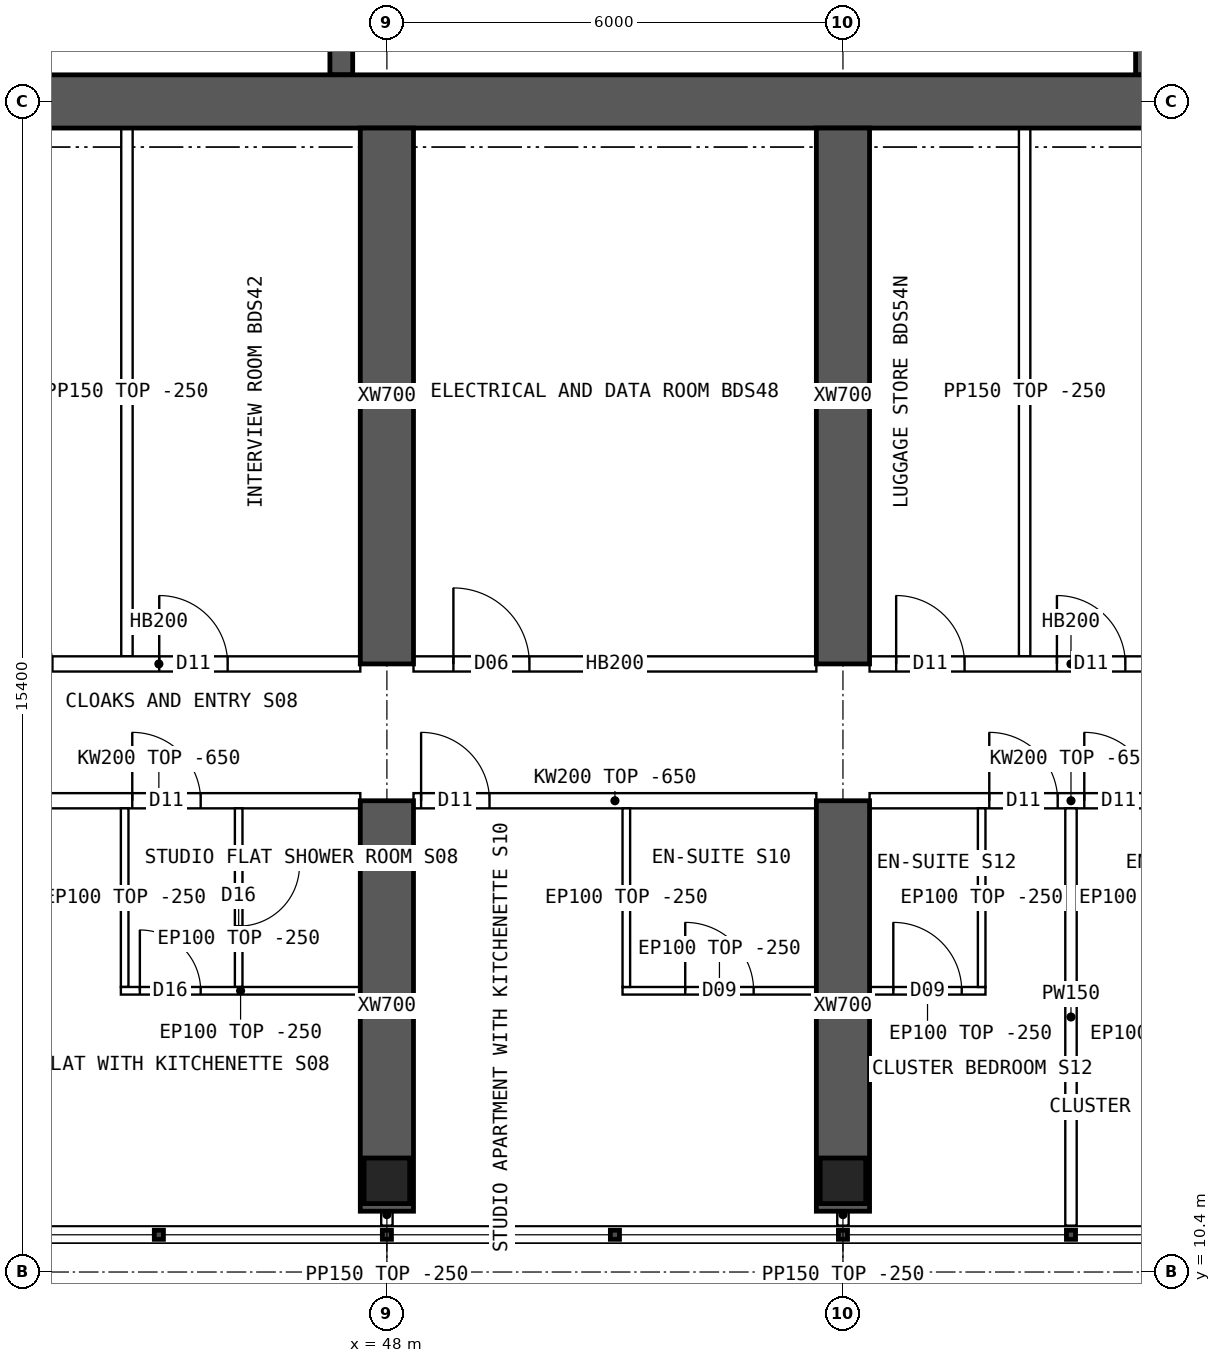
"""IFC4 building model, lengths in metres.
Left out: names, types, materials, properties, quantities, classifications, styles, units other than length and angle.
Written with IfcOpenShell. Run it as: python <this file> out.ifc"""

import sys

from ifc_helpers import new_model, si_unit, direction, frame, frame_2d, origin, origin_2d, place, context, subcontext, project, spatial, polyline, rectangle, hollow_rectangle, outline, extrude, element, fill, save


model = new_model("IFC4")
c1 = context("Model", 3, precision=1e-05, world=origin(), true_north=direction((0.0, 1.0)))
c2 = subcontext(c1, "Body", "Model", "MODEL_VIEW")
j1 = project(units=[si_unit("LENGTHUNIT", "METRE"), si_unit("PLANEANGLEUNIT", "RADIAN")], contexts=[c1])
p1 = place(None, origin())
s1 = spatial("IfcSite", under=j1, at=p1, CompositionType="ELEMENT")
p2 = place(p1, origin())
s2 = spatial("IfcBuilding", under=s1, at=p2, CompositionType="ELEMENT")
p3 = place(p2, frame((0.0, 0.0, 220.3)))
s3 = spatial("IfcBuildingStorey", under=s2, at=p3, CompositionType="ELEMENT", Elevation=220.3)
for number, where, z_axis, x_axis in (
    (1, (48.0, 11.6, 0.0), (0.0, 0.0, 1.0), (1.0, 0.0, 0.0)),
    (2, (54.0, 11.6, 0.0), (0.0, 0.0, 1.0), (1.0, 0.0, 0.0)),
):
    element("IfcColumn", number, at=place(p3, frame(where, z_axis=z_axis, x_axis=x_axis)), inside=s3, PredefinedType="COLUMN", context=c2, shape_type="SweptSolid", body=[
        extrude(hollow_rectangle(XDim=0.6, YDim=0.6, WallThickness=0.06, at=origin_2d()), origin(), (0.0, 0.0, 1.0), 3.75),
    ])
p4 = place(p3, frame((18.0, 25.8, 0.0), z_axis=(0.0, 0.0, 1.0), x_axis=(1.0, 0.0, 0.0)))
e3 = element("IfcWall", 3, at=p4, inside=s3, PredefinedType="SHEAR", context=c2, shape_type="SweptSolid", body=[
    extrude(rectangle(XDim=48.0, YDim=0.7, at=frame_2d((24.0, 0.0))), origin(), (0.0, 0.0, 1.0), 3.75),
])
for number, where, z_axis, x_axis in (
    (4, (58.0, 26.15, 0.0), (0.0, 0.0, 1.0), (0.0, 1.0, 0.0)),
    (5, (47.4, 26.15, 0.0), (0.0, 0.0, 1.0), (0.0, 1.0, 0.0)),
):
    element("IfcWall", number, at=place(p3, frame(where, z_axis=z_axis, x_axis=x_axis)), inside=s3, PredefinedType="SHEAR", context=c2, shape_type="SweptSolid", body=[
        extrude(rectangle(XDim=4.1, YDim=0.3, at=frame_2d((2.05, 0.0))), origin(), (0.0, 0.0, 1.0), 3.75),
    ])
p5 = place(p3, frame((48.0, 11.2, 0.0), z_axis=(0.0, 0.0, 1.0), x_axis=(0.0, 1.0, 0.0)))
e6 = element("IfcWall", 6, at=p5, inside=s3, PredefinedType="SHEAR", context=c2, shape_type="SweptSolid", body=[
    extrude(rectangle(XDim=5.4, YDim=0.7, at=frame_2d((2.7, 0.0))), origin(), (0.0, 0.0, 1.0), 3.75),
])
p6 = place(p3, frame((48.0, 18.4, 0.0), z_axis=(0.0, 0.0, 1.0), x_axis=(0.0, 1.0, 0.0)))
e7 = element("IfcWall", 7, at=p6, inside=s3, PredefinedType="SHEAR", context=c2, shape_type="SweptSolid", body=[
    extrude(rectangle(XDim=7.05, YDim=0.7, at=frame_2d((3.525, 0.0))), origin(), (0.0, 0.0, 1.0), 3.75),
])
p7 = place(p3, frame((54.0, 11.2, 0.0), z_axis=(0.0, 0.0, 1.0), x_axis=(0.0, 1.0, 0.0)))
e8 = element("IfcWall", 8, at=p7, inside=s3, PredefinedType="SHEAR", context=c2, shape_type="SweptSolid", body=[
    extrude(rectangle(XDim=5.4, YDim=0.7, at=frame_2d((2.7, 0.0))), origin(), (0.0, 0.0, 1.0), 3.75),
])
p8 = place(p3, frame((54.0, 18.4, 0.0), z_axis=(0.0, 0.0, 1.0), x_axis=(0.0, 1.0, 0.0)))
e9 = element("IfcWall", 9, at=p8, inside=s3, PredefinedType="SHEAR", context=c2, shape_type="SweptSolid", body=[
    extrude(rectangle(XDim=7.05, YDim=0.7, at=frame_2d((3.525, 0.0))), origin(), (0.0, 0.0, 1.0), 3.75),
])
p9 = place(p3, frame((42.35, 16.6, 0.0), z_axis=(0.0, 0.0, 1.0), x_axis=(1.0, 0.0, 0.0)))
e10 = element("IfcWall", 10, at=p9, inside=s3, PredefinedType="SOLIDWALL", context=c2, shape_type="SweptSolid", body=[
    extrude(outline(polyline([(0.0, 0.0), (5.3, 0.0), (5.3, 3.1), (0.0, 3.1), (0.0, 0.0)])), frame((0.0, 0.1, 0.0), z_axis=(0.0, -1.0, 0.0), x_axis=(1.0, 0.0, 0.0)), (0.0, 0.0, 1.0), 0.2),
])
p10 = place(p9, frame((2.3, 0.0, 0.0)))
e11 = element("IfcOpeningElement", 11, at=p10, cuts=e10, PredefinedType="OPENING", context=c2, shape_type="SweptSolid", body=[
    extrude(rectangle(XDim=0.9, YDim=2.1, at=frame_2d((0.45, 1.05))), frame((0.0, 0.11, 0.0), z_axis=(0.0, -1.0, 0.0), x_axis=(1.0, 0.0, 0.0)), (0.0, 0.0, 1.0), 0.22),
])
p11 = place(p3, frame((42.35, 18.4, 0.0), z_axis=(0.0, 0.0, 1.0), x_axis=(1.0, 0.0, 0.0)))
e12 = element("IfcWall", 12, at=p11, inside=s3, PredefinedType="SOLIDWALL", context=c2, shape_type="SweptSolid", body=[
    extrude(rectangle(XDim=5.3, YDim=0.2, at=frame_2d((2.65, 0.0))), origin(), (0.0, 0.0, 1.0), 3.5),
])
p12 = place(p11, frame((0.35, 0.0, 0.0)))
e13 = element("IfcOpeningElement", 13, at=p12, cuts=e12, PredefinedType="OPENING", context=c2, shape_type="SweptSolid", body=[
    extrude(rectangle(XDim=0.9, YDim=2.1, at=frame_2d((0.45, 1.05))), frame((0.0, 0.11, 0.0), z_axis=(0.0, -1.0, 0.0), x_axis=(1.0, 0.0, 0.0)), (0.0, 0.0, 1.0), 0.22),
])
p13 = place(p11, frame((2.655, 0.0, 0.0)))
e14 = element("IfcOpeningElement", 14, at=p13, cuts=e12, PredefinedType="OPENING", context=c2, shape_type="SweptSolid", body=[
    extrude(rectangle(XDim=0.9, YDim=2.1, at=frame_2d((0.45, 1.05))), frame((0.0, 0.11, 0.0), z_axis=(0.0, -1.0, 0.0), x_axis=(1.0, 0.0, 0.0)), (0.0, 0.0, 1.0), 0.22),
])
p14 = place(p3, frame((48.35, 16.6, 0.0), z_axis=(0.0, 0.0, 1.0), x_axis=(1.0, 0.0, 0.0)))
e15 = element("IfcWall", 15, at=p14, inside=s3, PredefinedType="SOLIDWALL", context=c2, shape_type="SweptSolid", body=[
    extrude(outline(polyline([(0.0, 0.0), (5.3, 0.0), (5.3, 3.1), (0.0, 3.1), (0.0, 0.0)])), frame((0.0, 0.1, 0.0), z_axis=(0.0, -1.0, 0.0), x_axis=(1.0, 0.0, 0.0)), (0.0, 0.0, 1.0), 0.2),
])
p15 = place(p14, frame((0.1, 0.0, 0.0)))
e16 = element("IfcOpeningElement", 16, at=p15, cuts=e15, PredefinedType="OPENING", context=c2, shape_type="SweptSolid", body=[
    extrude(rectangle(XDim=0.9, YDim=2.1, at=frame_2d((0.45, 1.05))), frame((0.0, 0.11, 0.0), z_axis=(0.0, -1.0, 0.0), x_axis=(1.0, 0.0, 0.0)), (0.0, 0.0, 1.0), 0.22),
])
p16 = place(p3, frame((48.35, 18.4, 0.0), z_axis=(0.0, 0.0, 1.0), x_axis=(1.0, 0.0, 0.0)))
e17 = element("IfcWall", 17, at=p16, inside=s3, PredefinedType="SOLIDWALL", context=c2, shape_type="SweptSolid", body=[
    extrude(rectangle(XDim=5.3, YDim=0.2, at=frame_2d((2.65, 0.0))), origin(), (0.0, 0.0, 1.0), 3.5),
])
p17 = place(p16, frame((0.525, 0.0, 0.0)))
e18 = element("IfcOpeningElement", 18, at=p17, cuts=e17, PredefinedType="OPENING", context=c2, shape_type="SweptSolid", body=[
    extrude(rectangle(XDim=1.0, YDim=2.1, at=frame_2d((0.5, 1.05))), frame((0.0, 0.11, 0.0), z_axis=(0.0, -1.0, 0.0), x_axis=(1.0, 0.0, 0.0)), (0.0, 0.0, 1.0), 0.22),
])
p18 = place(p3, frame((54.35, 16.6, 0.0), z_axis=(0.0, 0.0, 1.0), x_axis=(1.0, 0.0, 0.0)))
e19 = element("IfcWall", 19, at=p18, inside=s3, PredefinedType="SOLIDWALL", context=c2, shape_type="SweptSolid", body=[
    extrude(outline(polyline([(0.0, 0.0), (5.3, 0.0), (5.3, 3.1), (0.0, 3.1), (0.0, 0.0)])), frame((0.0, 0.1, 0.0), z_axis=(0.0, -1.0, 0.0), x_axis=(1.0, 0.0, 0.0)), (0.0, 0.0, 1.0), 0.2),
])
p19 = place(p18, frame((1.575, 0.0, 0.0)))
e20 = element("IfcOpeningElement", 20, at=p19, cuts=e19, PredefinedType="OPENING", context=c2, shape_type="SweptSolid", body=[
    extrude(rectangle(XDim=0.9, YDim=2.1, at=frame_2d((0.45, 1.05))), frame((0.0, 0.11, 0.0), z_axis=(0.0, -1.0, 0.0), x_axis=(1.0, 0.0, 0.0)), (0.0, 0.0, 1.0), 0.22),
])
p20 = place(p18, frame((2.825, 0.0, 0.0)))
e21 = element("IfcOpeningElement", 21, at=p20, cuts=e19, PredefinedType="OPENING", context=c2, shape_type="SweptSolid", body=[
    extrude(rectangle(XDim=0.9, YDim=2.1, at=frame_2d((0.45, 1.05))), frame((0.0, 0.11, 0.0), z_axis=(0.0, -1.0, 0.0), x_axis=(1.0, 0.0, 0.0)), (0.0, 0.0, 1.0), 0.22),
])
p21 = place(p3, frame((54.35, 18.4, 0.0), z_axis=(0.0, 0.0, 1.0), x_axis=(1.0, 0.0, 0.0)))
e22 = element("IfcWall", 22, at=p21, inside=s3, PredefinedType="SOLIDWALL", context=c2, shape_type="SweptSolid", body=[
    extrude(rectangle(XDim=5.3, YDim=0.2, at=frame_2d((2.65, 0.0))), origin(), (0.0, 0.0, 1.0), 3.5),
])
p22 = place(p21, frame((0.35, 0.0, 0.0)))
e23 = element("IfcOpeningElement", 23, at=p22, cuts=e22, PredefinedType="OPENING", context=c2, shape_type="SweptSolid", body=[
    extrude(rectangle(XDim=0.9, YDim=2.1, at=frame_2d((0.45, 1.05))), frame((0.0, 0.11, 0.0), z_axis=(0.0, -1.0, 0.0), x_axis=(1.0, 0.0, 0.0)), (0.0, 0.0, 1.0), 0.22),
])
p23 = place(p21, frame((2.465, 0.0, 0.0)))
e24 = element("IfcOpeningElement", 24, at=p23, cuts=e22, PredefinedType="OPENING", context=c2, shape_type="SweptSolid", body=[
    extrude(rectangle(XDim=0.9, YDim=2.1, at=frame_2d((0.45, 1.05))), frame((0.0, 0.11, 0.0), z_axis=(0.0, -1.0, 0.0), x_axis=(1.0, 0.0, 0.0)), (0.0, 0.0, 1.0), 0.22),
])
p24 = place(p3, frame((47.65, 14.1, 0.0), z_axis=(0.0, 0.0, 1.0), x_axis=(-1.0, 0.0, 0.0)))
e25 = element("IfcWall", 25, at=p24, inside=s3, PredefinedType="PARTITIONING", context=c2, shape_type="SweptSolid", body=[
    extrude(rectangle(XDim=3.15, YDim=0.1, at=frame_2d((1.575, 0.0))), origin(), (0.0, 0.0, 1.0), 3.5),
])
p25 = place(p24, frame((2.1, 0.0, 0.0)))
e26 = element("IfcOpeningElement", 26, at=p25, cuts=e25, PredefinedType="OPENING", context=c2, shape_type="SweptSolid", body=[
    extrude(rectangle(XDim=0.8, YDim=2.1, at=frame_2d((0.4, 1.05))), frame((0.0, 0.06, 0.0), z_axis=(0.0, -1.0, 0.0), x_axis=(1.0, 0.0, 0.0)), (0.0, 0.0, 1.0), 0.12),
])
p26 = place(p3, frame((44.55, 14.15, 0.0), z_axis=(0.0, 0.0, 1.0), x_axis=(0.0, 1.0, 0.0)))
e27 = element("IfcWall", 27, at=p26, inside=s3, PredefinedType="PARTITIONING", context=c2, shape_type="SweptSolid", body=[
    extrude(outline(polyline([(0.0, 0.0), (2.35, 0.0), (2.35, 3.1), (2.302, 3.1), (2.3, 3.5), (0.0, 3.5), (0.0, 0.0)])), frame((0.0, 0.05, 0.0), z_axis=(0.0, -1.0, 0.0), x_axis=(1.0, 0.0, 0.0)), (0.0, 0.0, 1.0), 0.1),
])
p27 = place(p3, frame((46.05, 14.15, 0.0), z_axis=(0.0, 0.0, 1.0), x_axis=(0.0, 1.0, 0.0)))
e28 = element("IfcWall", 28, at=p27, inside=s3, PredefinedType="PARTITIONING", context=c2, shape_type="SweptSolid", body=[
    extrude(outline(polyline([(0.0, 0.0), (2.35, 0.0), (2.35, 3.1), (2.302, 3.1), (2.3, 3.5), (0.0, 3.5), (0.0, 0.0)])), frame((0.0, 0.05, 0.0), z_axis=(0.0, -1.0, 0.0), x_axis=(1.0, 0.0, 0.0)), (0.0, 0.0, 1.0), 0.1),
])
p28 = place(p27, frame((0.8, 0.0, 0.0)))
e29 = element("IfcOpeningElement", 29, at=p28, cuts=e28, PredefinedType="OPENING", context=c2, shape_type="SweptSolid", body=[
    extrude(rectangle(XDim=0.8, YDim=2.1, at=frame_2d((0.4, 1.05))), frame((0.0, 0.06, 0.0), z_axis=(0.0, -1.0, 0.0), x_axis=(1.0, 0.0, 0.0)), (0.0, 0.0, 1.0), 0.12),
])
p29 = place(p3, frame((53.65, 14.1, 0.0), z_axis=(0.0, 0.0, 1.0), x_axis=(-1.0, 0.0, 0.0)))
e30 = element("IfcWall", 30, at=p29, inside=s3, PredefinedType="PARTITIONING", context=c2, shape_type="SweptSolid", body=[
    extrude(rectangle(XDim=2.55, YDim=0.1, at=frame_2d((1.275, 0.0))), origin(), (0.0, 0.0, 1.0), 3.5),
])
p30 = place(p29, frame((0.825, 0.0, 0.0)))
e31 = element("IfcOpeningElement", 31, at=p30, cuts=e30, PredefinedType="OPENING", context=c2, shape_type="SweptSolid", body=[
    extrude(rectangle(XDim=0.9, YDim=2.1, at=frame_2d((0.45, 1.05))), frame((0.0, 0.06, 0.0), z_axis=(0.0, -1.0, 0.0), x_axis=(1.0, 0.0, 0.0)), (0.0, 0.0, 1.0), 0.12),
])
p31 = place(p3, frame((51.15, 14.15, 0.0), z_axis=(0.0, 0.0, 1.0), x_axis=(0.0, 1.0, 0.0)))
e32 = element("IfcWall", 32, at=p31, inside=s3, PredefinedType="PARTITIONING", context=c2, shape_type="SweptSolid", body=[
    extrude(outline(polyline([(0.0, 0.0), (2.35, 0.0), (2.35, 3.1), (2.302, 3.1), (2.3, 3.5), (0.0, 3.5), (0.0, 0.0)])), frame((0.0, 0.05, 0.0), z_axis=(0.0, -1.0, 0.0), x_axis=(1.0, 0.0, 0.0)), (0.0, 0.0, 1.0), 0.1),
])
p32 = place(p3, frame((57.0, 11.01, 0.0), z_axis=(0.0, 0.0, 1.0), x_axis=(0.0, 1.0, 0.0)))
e33 = element("IfcWall", 33, at=p32, inside=s3, PredefinedType="PARTITIONING", context=c2, shape_type="SweptSolid", body=[
    extrude(outline(polyline([(0.0, 0.0), (5.49, 0.0), (5.49, 3.1), (5.442, 3.1), (5.44, 3.5), (0.792, 3.5), (0.79, 3.1), (0.392, 3.1), (0.39, 3.5), (0.0, 3.5), (0.0, 0.0)])), frame((0.0, 0.075, 0.0), z_axis=(0.0, -1.0, 0.0), x_axis=(1.0, 0.0, 0.0)), (0.0, 0.0, 1.0), 0.15),
])
p33 = place(p3, frame((55.875, 14.1, 0.0), z_axis=(0.0, 0.0, 1.0), x_axis=(-1.0, 0.0, 0.0)))
e34 = element("IfcWall", 34, at=p33, inside=s3, PredefinedType="PARTITIONING", context=c2, shape_type="SweptSolid", body=[
    extrude(rectangle(XDim=1.525, YDim=0.1, at=frame_2d((0.762, 0.0))), origin(), (0.0, 0.0, 1.0), 3.5),
])
p34 = place(p33, frame((0.312, 0.0, 0.0)))
e35 = element("IfcOpeningElement", 35, at=p34, cuts=e34, PredefinedType="OPENING", context=c2, shape_type="SweptSolid", body=[
    extrude(rectangle(XDim=0.9, YDim=2.1, at=frame_2d((0.45, 1.05))), frame((0.0, 0.06, 0.0), z_axis=(0.0, -1.0, 0.0), x_axis=(1.0, 0.0, 0.0)), (0.0, 0.0, 1.0), 0.12),
])
p35 = place(p3, frame((55.825, 14.15, 0.0), z_axis=(0.0, 0.0, 1.0), x_axis=(0.0, 1.0, 0.0)))
e36 = element("IfcWall", 36, at=p35, inside=s3, PredefinedType="PARTITIONING", context=c2, shape_type="SweptSolid", body=[
    extrude(outline(polyline([(0.0, 0.0), (2.35, 0.0), (2.35, 3.1), (2.302, 3.1), (2.3, 3.5), (0.0, 3.5), (0.0, 0.0)])), frame((0.0, 0.05, 0.0), z_axis=(0.0, -1.0, 0.0), x_axis=(1.0, 0.0, 0.0)), (0.0, 0.0, 1.0), 0.1),
])
for number, where, z_axis, x_axis in (
    (37, (44.58, 18.5, 0.0), (0.0, 0.0, 1.0), (0.0, 1.0, 0.0)),
    (38, (56.39, 18.5, 0.0), (0.0, 0.0, 1.0), (0.0, 1.0, 0.0)),
):
    element("IfcWall", number, at=place(p3, frame(where, z_axis=z_axis, x_axis=x_axis)), inside=s3, PredefinedType="PARTITIONING", context=c2, shape_type="SweptSolid", body=[
        extrude(rectangle(XDim=6.95, YDim=0.15, at=frame_2d((3.475, 0.0))), origin(), (0.0, 0.0, 1.0), 3.5),
    ])
for number, where, z_axis, x_axis in (
    (39, (48.0, 11.3, 0.0), (0.0, 0.0, 1.0), (0.0, -1.0, 0.0)),
    (40, (54.0, 11.3, 0.0), (0.0, 0.0, 1.0), (0.0, -1.0, 0.0)),
):
    element("IfcWall", number, at=place(p3, frame(where, z_axis=z_axis, x_axis=x_axis)), inside=s3, PredefinedType="PARTITIONING", context=c2, shape_type="SweptSolid", body=[
        extrude(rectangle(XDim=0.29, YDim=0.15, at=frame_2d((0.145, 0.0))), origin(), (0.0, 0.0, 1.0), 3.5),
    ])
p36 = place(p25, origin())
e41 = element("IfcDoor", 41, at=p36, inside=s3, OperationType="SINGLE_SWING_RIGHT", PredefinedType="DOOR", context=c2, shape_type="SweptSolid", body=[
    extrude(rectangle(XDim=0.8, YDim=2.1, at=frame_2d((0.4, 1.05))), frame((0.0, 0.025, 0.0), z_axis=(0.0, -1.0, 0.0), x_axis=(1.0, 0.0, 0.0)), (0.0, 0.0, 1.0), 0.05),
])
fill(e26, e41)
p37 = place(p28, origin())
e42 = element("IfcDoor", 42, at=p37, inside=s3, OperationType="SINGLE_SWING_RIGHT", PredefinedType="DOOR", context=c2, shape_type="SweptSolid", body=[
    extrude(rectangle(XDim=0.8, YDim=2.1, at=frame_2d((0.4, 1.05))), frame((0.0, 0.025, 0.0), z_axis=(0.0, -1.0, 0.0), x_axis=(1.0, 0.0, 0.0)), (0.0, 0.0, 1.0), 0.05),
])
fill(e29, e42)
p38 = place(p10, origin())
e43 = element("IfcDoor", 43, at=p38, inside=s3, OperationType="SINGLE_SWING_LEFT", PredefinedType="DOOR", context=c2, shape_type="SweptSolid", body=[
    extrude(rectangle(XDim=0.9, YDim=2.1, at=frame_2d((0.45, 1.05))), frame((0.0, 0.025, 0.0), z_axis=(0.0, -1.0, 0.0), x_axis=(1.0, 0.0, 0.0)), (0.0, 0.0, 1.0), 0.05),
])
fill(e11, e43)
p39 = place(p30, origin())
e44 = element("IfcDoor", 44, at=p39, inside=s3, OperationType="SINGLE_SWING_RIGHT", PredefinedType="DOOR", context=c2, shape_type="SweptSolid", body=[
    extrude(rectangle(XDim=0.9, YDim=2.1, at=frame_2d((0.45, 1.05))), frame((0.0, 0.025, 0.0), z_axis=(0.0, -1.0, 0.0), x_axis=(1.0, 0.0, 0.0)), (0.0, 0.0, 1.0), 0.05),
])
fill(e31, e44)
p40 = place(p15, origin())
e45 = element("IfcDoor", 45, at=p40, inside=s3, OperationType="SINGLE_SWING_LEFT", PredefinedType="DOOR", context=c2, shape_type="SweptSolid", body=[
    extrude(rectangle(XDim=0.9, YDim=2.1, at=frame_2d((0.45, 1.05))), frame((0.0, 0.025, 0.0), z_axis=(0.0, -1.0, 0.0), x_axis=(1.0, 0.0, 0.0)), (0.0, 0.0, 1.0), 0.05),
])
fill(e16, e45)
p41 = place(p34, origin())
e46 = element("IfcDoor", 46, at=p41, inside=s3, OperationType="SINGLE_SWING_RIGHT", PredefinedType="DOOR", context=c2, shape_type="SweptSolid", body=[
    extrude(rectangle(XDim=0.9, YDim=2.1, at=frame_2d((0.45, 1.05))), frame((0.0, 0.025, 0.0), z_axis=(0.0, -1.0, 0.0), x_axis=(1.0, 0.0, 0.0)), (0.0, 0.0, 1.0), 0.05),
])
fill(e35, e46)
p42 = place(p19, origin())
e47 = element("IfcDoor", 47, at=p42, inside=s3, OperationType="SINGLE_SWING_LEFT", PredefinedType="DOOR", context=c2, shape_type="SweptSolid", body=[
    extrude(rectangle(XDim=0.9, YDim=2.1, at=frame_2d((0.45, 1.05))), frame((0.0, 0.025, 0.0), z_axis=(0.0, -1.0, 0.0), x_axis=(1.0, 0.0, 0.0)), (0.0, 0.0, 1.0), 0.05),
])
fill(e20, e47)
p43 = place(p20, origin())
e48 = element("IfcDoor", 48, at=p43, inside=s3, OperationType="SINGLE_SWING_LEFT", PredefinedType="DOOR", context=c2, shape_type="SweptSolid", body=[
    extrude(rectangle(XDim=0.9, YDim=2.1, at=frame_2d((0.45, 1.05))), frame((0.0, 0.025, 0.0), z_axis=(0.0, -1.0, 0.0), x_axis=(1.0, 0.0, 0.0)), (0.0, 0.0, 1.0), 0.05),
])
fill(e21, e48)
p44 = place(p13, origin())
e49 = element("IfcDoor", 49, at=p44, inside=s3, OperationType="SINGLE_SWING_LEFT", PredefinedType="DOOR", context=c2, shape_type="SweptSolid", body=[
    extrude(rectangle(XDim=0.9, YDim=2.1, at=frame_2d((0.45, 1.05))), frame((0.0, 0.025, 0.0), z_axis=(0.0, -1.0, 0.0), x_axis=(1.0, 0.0, 0.0)), (0.0, 0.0, 1.0), 0.05),
])
fill(e14, e49)
p45 = place(p17, origin())
e50 = element("IfcDoor", 50, at=p45, inside=s3, OperationType="SINGLE_SWING_LEFT", PredefinedType="DOOR", context=c2, shape_type="SweptSolid", body=[
    extrude(rectangle(XDim=1.0, YDim=2.1, at=frame_2d((0.5, 1.05))), frame((0.0, 0.025, 0.0), z_axis=(0.0, -1.0, 0.0), x_axis=(1.0, 0.0, 0.0)), (0.0, 0.0, 1.0), 0.05),
])
fill(e18, e50)
p46 = place(p22, origin())
e51 = element("IfcDoor", 51, at=p46, inside=s3, OperationType="SINGLE_SWING_LEFT", PredefinedType="DOOR", context=c2, shape_type="SweptSolid", body=[
    extrude(rectangle(XDim=0.9, YDim=2.1, at=frame_2d((0.45, 1.05))), frame((0.0, 0.025, 0.0), z_axis=(0.0, -1.0, 0.0), x_axis=(1.0, 0.0, 0.0)), (0.0, 0.0, 1.0), 0.05),
])
fill(e23, e51)
p47 = place(p23, origin())
e52 = element("IfcDoor", 52, at=p47, inside=s3, OperationType="SINGLE_SWING_LEFT", PredefinedType="DOOR", context=c2, shape_type="SweptSolid", body=[
    extrude(rectangle(XDim=0.9, YDim=2.1, at=frame_2d((0.45, 1.05))), frame((0.0, 0.025, 0.0), z_axis=(0.0, -1.0, 0.0), x_axis=(1.0, 0.0, 0.0)), (0.0, 0.0, 1.0), 0.05),
])
fill(e24, e52)
save(model, sys.argv[1])
